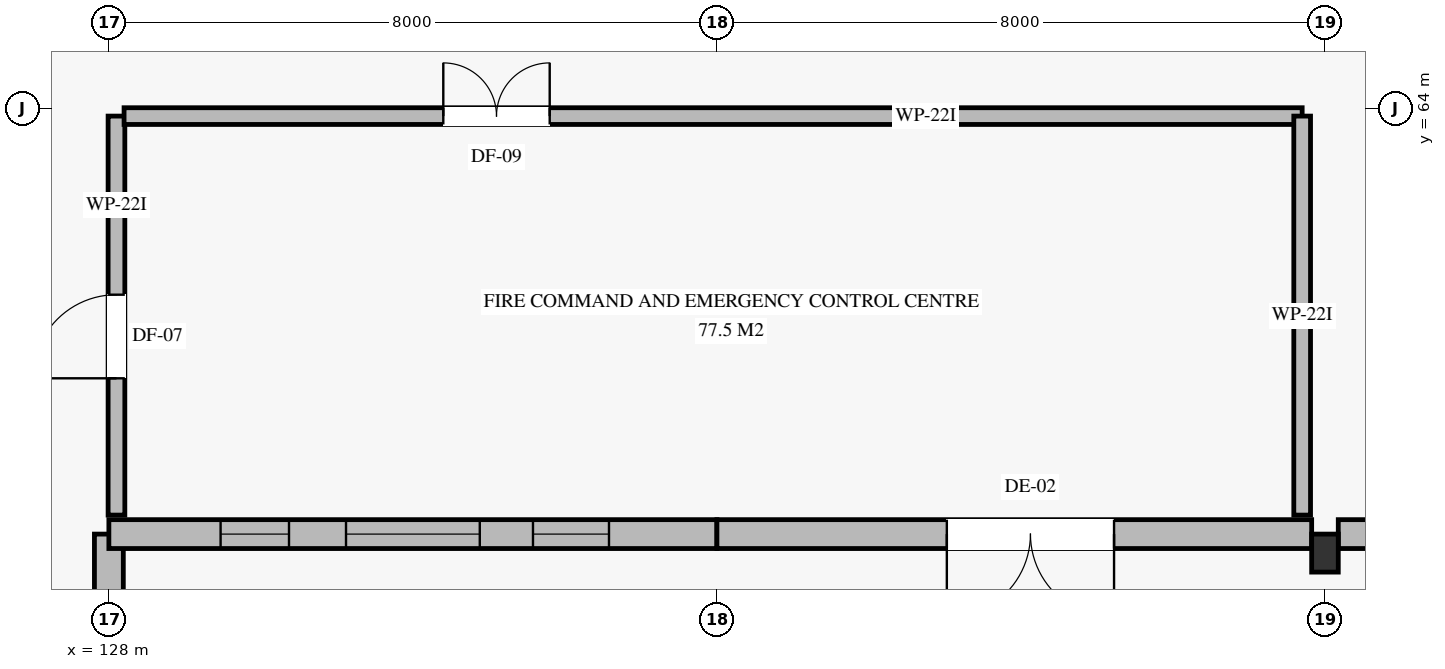
"""IFC4 building model, lengths in metres.
Left out: names, types, materials, properties, quantities, classifications, styles, units other than length and angle.
Written with IfcOpenShell. Run it as: python <this file> out.ifc"""

import sys

from ifc_helpers import new_model, si_unit, direction, frame, frame_2d, origin, origin_2d, place, context, subcontext, project, spatial, rectangle, extrude, element, fill, save


model = new_model("IFC4")
c1 = context("Model", 3, precision=1e-05, world=origin(), true_north=direction((0.0, 1.0)))
c2 = subcontext(c1, "Body", "Model", "MODEL_VIEW")
j1 = project(units=[si_unit("LENGTHUNIT", "METRE"), si_unit("PLANEANGLEUNIT", "RADIAN")], contexts=[c1])
p1 = place(None, origin())
s1 = spatial("IfcSite", under=j1, at=p1, CompositionType="ELEMENT")
p2 = place(p1, origin())
s2 = spatial("IfcBuilding", under=s1, at=p2, CompositionType="ELEMENT")
p3 = place(p2, origin())
s3 = spatial("IfcBuildingStorey", under=s2, at=p3, CompositionType="ELEMENT", Elevation=0.0)
p4 = place(p3, frame((144.0, 58.15, 0.0), z_axis=(0.0, 0.0, 1.0), x_axis=(1.0, 0.0, 0.0)))
e1 = element("IfcColumn", 1, at=p4, inside=s3, PredefinedType="PILASTER", context=c2, shape_type="SweptSolid", body=[
    extrude(rectangle(XDim=0.35, YDim=0.5, at=origin_2d()), origin(), (0.0, 0.0, 1.0), 4.8),
])
p5 = place(p3, frame((128.0, 58.4, 0.0), z_axis=(0.0, 0.0, 1.0), x_axis=(0.0, -1.0, 0.0)))
e2 = element("IfcWall", 2, at=p5, inside=s3, PredefinedType="STANDARD", context=c2, shape_type="SweptSolid", body=[
    extrude(rectangle(XDim=1.975, YDim=0.38, at=frame_2d((0.987, 0.0))), origin(), (0.0, 0.0, 1.0), 2.85),
])
p6 = place(p3, frame((136.0, 58.4, 0.0), z_axis=(0.0, 0.0, 1.0), x_axis=(-1.0, 0.0, 0.0)))
e3 = element("IfcWall", 3, at=p6, inside=s3, PredefinedType="STANDARD", context=c2, shape_type="SweptSolid", body=[
    extrude(rectangle(XDim=8.0, YDim=0.38, at=frame_2d((4.0, 0.0))), origin(), (0.0, 0.0, 1.0), 4.05),
])
p7 = place(p6, frame((1.42, 0.0, 0.72)))
e4 = element("IfcOpeningElement", 4, at=p7, cuts=e3, PredefinedType="OPENING", context=c2, shape_type="SweptSolid", body=[
    extrude(rectangle(XDim=1.0, YDim=1.9, at=frame_2d((0.5, 0.95))), frame((0.0, 0.2, 0.0), z_axis=(0.0, -1.0, 0.0), x_axis=(1.0, 0.0, 0.0)), (0.0, 0.0, 1.0), 0.4),
])
p8 = place(p6, frame((3.12, 0.0, 0.72)))
e5 = element("IfcOpeningElement", 5, at=p8, cuts=e3, PredefinedType="OPENING", context=c2, shape_type="SweptSolid", body=[
    extrude(rectangle(XDim=1.76, YDim=1.9, at=frame_2d((0.88, 0.95))), frame((0.0, 0.2, 0.0), z_axis=(0.0, -1.0, 0.0), x_axis=(1.0, 0.0, 0.0)), (0.0, 0.0, 1.0), 0.4),
])
p9 = place(p6, frame((5.63, 0.0, 0.72)))
e6 = element("IfcOpeningElement", 6, at=p9, cuts=e3, PredefinedType="OPENING", context=c2, shape_type="SweptSolid", body=[
    extrude(rectangle(XDim=0.9, YDim=2.35, at=frame_2d((0.45, 1.175))), frame((0.0, 0.2, 0.0), z_axis=(0.0, -1.0, 0.0), x_axis=(1.0, 0.0, 0.0)), (0.0, 0.0, 1.0), 0.4),
])
p10 = place(p3, frame((143.825, 58.4, 0.0), z_axis=(0.0, 0.0, 1.0), x_axis=(-1.0, 0.0, 0.0)))
e7 = element("IfcWall", 7, at=p10, inside=s3, PredefinedType="STANDARD", context=c2, shape_type="SweptSolid", body=[
    extrude(rectangle(XDim=7.825, YDim=0.38, at=frame_2d((3.913, 0.0))), origin(), (0.0, 0.0, 1.0), 4.05),
])
p11 = place(p10, frame((2.6, 0.0, 0.0)))
e8 = element("IfcOpeningElement", 8, at=p11, cuts=e7, PredefinedType="OPENING", context=c2, shape_type="SweptSolid", body=[
    extrude(rectangle(XDim=2.2, YDim=2.6, at=frame_2d((1.1, 1.3))), frame((0.0, 0.2, 0.0), z_axis=(0.0, -1.0, 0.0), x_axis=(1.0, 0.0, 0.0)), (0.0, 0.0, 1.0), 0.4),
])
p12 = place(p3, frame((152.0, 58.4, 0.0), z_axis=(0.0, 0.0, 1.0), x_axis=(-1.0, 0.0, 0.0)))
e9 = element("IfcWall", 9, at=p12, inside=s3, PredefinedType="STANDARD", context=c2, shape_type="SweptSolid", body=[
    extrude(rectangle(XDim=7.825, YDim=0.38, at=frame_2d((3.913, 0.0))), origin(), (0.0, 0.0, 1.0), 4.05),
])
p13 = place(p12, frame((1.453, 0.0, 0.72)))
e10 = element("IfcOpeningElement", 10, at=p13, cuts=e9, PredefinedType="OPENING", context=c2, shape_type="SweptSolid", body=[
    extrude(rectangle(XDim=0.85, YDim=2.4, at=frame_2d((0.425, 1.2))), frame((0.0, 0.2, 0.0), z_axis=(0.0, -1.0, 0.0), x_axis=(1.0, 0.0, 0.0)), (0.0, 0.0, 1.0), 0.4),
])
p14 = place(p12, frame((3.337, 0.0, 0.72)))
e11 = element("IfcOpeningElement", 11, at=p14, cuts=e9, PredefinedType="OPENING", context=c2, shape_type="SweptSolid", body=[
    extrude(rectangle(XDim=1.15, YDim=2.0, at=frame_2d((0.575, 1.0))), frame((0.0, 0.2, 0.0), z_axis=(0.0, -1.0, 0.0), x_axis=(1.0, 0.0, 0.0)), (0.0, 0.0, 1.0), 0.4),
])
p15 = place(p12, frame((5.507, 0.0, 0.72)))
e12 = element("IfcOpeningElement", 12, at=p15, cuts=e9, PredefinedType="OPENING", context=c2, shape_type="SweptSolid", body=[
    extrude(rectangle(XDim=0.88, YDim=1.95, at=frame_2d((0.44, 0.975))), frame((0.0, 0.2, 0.0), z_axis=(0.0, -1.0, 0.0), x_axis=(1.0, 0.0, 0.0)), (0.0, 0.0, 1.0), 0.4),
])
p16 = place(p3, frame((128.1, 58.65, 0.0), z_axis=(0.0, 0.0, 1.0), x_axis=(0.0, 1.0, 0.0)))
e13 = element("IfcWall", 13, at=p16, inside=s3, PredefinedType="PARTITIONING", context=c2, shape_type="SweptSolid", body=[
    extrude(rectangle(XDim=5.25, YDim=0.22, at=frame_2d((2.625, 0.0))), origin(), (0.0, 0.0, 1.0), 2.842),
])
p17 = place(p16, frame((1.8, 0.0, 0.0)))
e14 = element("IfcOpeningElement", 14, at=p17, cuts=e13, PredefinedType="OPENING", context=c2, shape_type="SweptSolid", body=[
    extrude(rectangle(XDim=1.1, YDim=2.2, at=frame_2d((0.55, 1.1))), frame((0.0, 0.12, 0.0), z_axis=(0.0, -1.0, 0.0), x_axis=(1.0, 0.0, 0.0)), (0.0, 0.0, 1.0), 0.24),
])
p18 = place(p3, frame((128.2, 63.9, 0.0), z_axis=(0.0, 0.0, 1.0), x_axis=(1.0, 0.0, 0.0)))
e15 = element("IfcWall", 15, at=p18, inside=s3, PredefinedType="PARTITIONING", context=c2, shape_type="SweptSolid", body=[
    extrude(rectangle(XDim=15.5, YDim=0.22, at=frame_2d((7.75, 0.0))), origin(), (0.0, 0.0, 1.0), 2.842),
])
p19 = place(p18, frame((4.2, 0.0, 0.0)))
e16 = element("IfcOpeningElement", 16, at=p19, cuts=e15, PredefinedType="OPENING", context=c2, shape_type="SweptSolid", body=[
    extrude(rectangle(XDim=1.4, YDim=2.2, at=frame_2d((0.7, 1.1))), frame((0.0, 0.12, 0.0), z_axis=(0.0, -1.0, 0.0), x_axis=(1.0, 0.0, 0.0)), (0.0, 0.0, 1.0), 0.24),
])
p20 = place(p3, frame((143.7, 58.65, 0.0), z_axis=(0.0, 0.0, 1.0), x_axis=(0.0, 1.0, 0.0)))
e17 = element("IfcWall", 17, at=p20, inside=s3, PredefinedType="PARTITIONING", context=c2, shape_type="SweptSolid", body=[
    extrude(rectangle(XDim=5.25, YDim=0.22, at=frame_2d((2.625, 0.0))), origin(), (0.0, 0.0, 1.0), 2.842),
])
p21 = place(p7, origin())
e18 = element("IfcWindow", 18, at=p21, inside=s3, PartitioningType="SINGLE_PANEL", PredefinedType="WINDOW", context=c2, shape_type="SweptSolid", body=[
    extrude(rectangle(XDim=1.0, YDim=1.9, at=frame_2d((0.5, 0.95))), frame((0.0, 0.03, 0.0), z_axis=(0.0, -1.0, 0.0), x_axis=(1.0, 0.0, 0.0)), (0.0, 0.0, 1.0), 0.06),
])
fill(e4, e18)
p22 = place(p8, origin())
e19 = element("IfcWindow", 19, at=p22, inside=s3, PartitioningType="SINGLE_PANEL", PredefinedType="WINDOW", context=c2, shape_type="SweptSolid", body=[
    extrude(rectangle(XDim=1.76, YDim=1.9, at=frame_2d((0.88, 0.95))), frame((0.0, 0.03, 0.0), z_axis=(0.0, -1.0, 0.0), x_axis=(1.0, 0.0, 0.0)), (0.0, 0.0, 1.0), 0.06),
])
fill(e5, e19)
p23 = place(p9, origin())
e20 = element("IfcWindow", 20, at=p23, inside=s3, PartitioningType="SINGLE_PANEL", PredefinedType="WINDOW", context=c2, shape_type="SweptSolid", body=[
    extrude(rectangle(XDim=0.9, YDim=2.35, at=frame_2d((0.45, 1.175))), frame((0.0, 0.03, 0.0), z_axis=(0.0, -1.0, 0.0), x_axis=(1.0, 0.0, 0.0)), (0.0, 0.0, 1.0), 0.06),
])
fill(e6, e20)
p24 = place(p11, origin())
e21 = element("IfcDoor", 21, at=p24, inside=s3, OperationType="DOUBLE_DOOR_SINGLE_SWING", PredefinedType="DOOR", context=c2, shape_type="SweptSolid", body=[
    extrude(rectangle(XDim=2.2, YDim=2.6, at=frame_2d((1.1, 1.3))), frame((0.0, 0.025, 0.0), z_axis=(0.0, -1.0, 0.0), x_axis=(1.0, 0.0, 0.0)), (0.0, 0.0, 1.0), 0.05),
])
fill(e8, e21)
p25 = place(p17, origin())
e22 = element("IfcDoor", 22, at=p25, inside=s3, OperationType="SINGLE_SWING_LEFT", PredefinedType="DOOR", context=c2, shape_type="SweptSolid", body=[
    extrude(rectangle(XDim=1.1, YDim=2.2, at=frame_2d((0.55, 1.1))), frame((0.0, 0.025, 0.0), z_axis=(0.0, -1.0, 0.0), x_axis=(1.0, 0.0, 0.0)), (0.0, 0.0, 1.0), 0.05),
])
fill(e14, e22)
p26 = place(p19, origin())
e23 = element("IfcDoor", 23, at=p26, inside=s3, OperationType="DOUBLE_DOOR_SINGLE_SWING", PredefinedType="DOOR", context=c2, shape_type="SweptSolid", body=[
    extrude(rectangle(XDim=1.4, YDim=2.2, at=frame_2d((0.7, 1.1))), frame((0.0, 0.025, 0.0), z_axis=(0.0, -1.0, 0.0), x_axis=(1.0, 0.0, 0.0)), (0.0, 0.0, 1.0), 0.05),
])
fill(e16, e23)
save(model, sys.argv[1])
